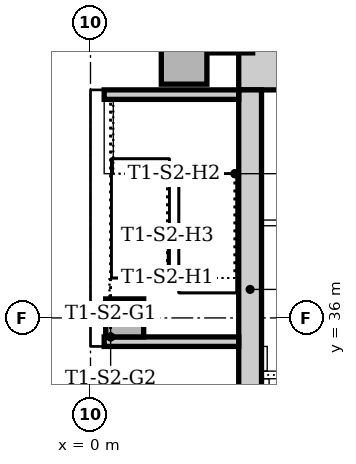
"""IFC4 building model, lengths in metres.
Left out: names, types, materials, properties, quantities, classifications, styles, units other than length and angle.
Written with IfcOpenShell. Run it as: python <this file> out.ifc"""

import sys

from ifc_helpers import new_model, si_unit, direction, frame, frame_2d, origin, origin_2d, place, context, subcontext, project, spatial, rectangle, extrude, element, fill, save


model = new_model("IFC4")
c1 = context("Model", 3, precision=1e-05, world=origin(), true_north=direction((0.0, 1.0)))
c2 = subcontext(c1, "Body", "Model", "MODEL_VIEW")
j1 = project(units=[si_unit("LENGTHUNIT", "METRE"), si_unit("PLANEANGLEUNIT", "RADIAN")], contexts=[c1])
p1 = place(None, origin())
s1 = spatial("IfcSite", under=j1, at=p1, CompositionType="ELEMENT")
p2 = place(p1, origin())
s2 = spatial("IfcBuilding", under=s1, at=p2, CompositionType="ELEMENT")
p3 = place(p2, frame((0.0, 0.0, -5.0)))
s3 = spatial("IfcBuildingStorey", under=s2, at=p3, CompositionType="ELEMENT", Elevation=-5.0)
p4 = place(p3, frame((23.7, 42.6, 0.0), z_axis=(0.0, 0.0, 1.0), x_axis=(-1.0, 0.0, 0.0)))
e1 = element("IfcWall", 1, at=p4, inside=s3, PredefinedType="SOLIDWALL", context=c2, shape_type="SweptSolid", body=[
    extrude(rectangle(XDim=19.8, YDim=1.2, at=frame_2d((9.9, 0.0))), origin(), (0.0, 0.0, 1.0), 5.0),
])
p5 = place(p3, frame((4.2, 42.0, 0.0), z_axis=(0.0, 0.0, 1.0), x_axis=(0.0, -1.0, 0.0)))
e2 = element("IfcWall", 2, at=p5, inside=s3, PredefinedType="SOLIDWALL", context=c2, shape_type="SweptSolid", body=[
    extrude(rectangle(XDim=10.5, YDim=0.6, at=frame_2d((5.25, 0.0))), origin(), (0.0, 0.0, 1.0), 5.0),
])
p6 = place(p5, frame((5.3, 0.0, 0.0)))
e3 = element("IfcOpeningElement", 3, at=p6, cuts=e2, PredefinedType="OPENING", context=c2, shape_type="SweptSolid", body=[
    extrude(rectangle(XDim=1.0, YDim=2.1, at=frame_2d((0.5, 1.05))), frame((0.0, 0.31, 0.0), z_axis=(0.0, -1.0, 0.0), x_axis=(1.0, 0.0, 0.0)), (0.0, 0.0, 1.0), 0.62),
])
p7 = place(p3, frame((0.36, 35.375, 0.0), z_axis=(0.0, 0.0, 1.0), x_axis=(1.0, 0.0, 0.0)))
e4 = element("IfcWall", 4, at=p7, inside=s3, PredefinedType="SOLIDWALL", context=c2, shape_type="SweptSolid", body=[
    extrude(rectangle(XDim=3.54, YDim=0.25, at=frame_2d((1.77, 0.0))), origin(), (0.0, 0.0, 1.0), 5.0),
])
p8 = place(p7, frame((2.14, 0.0, 0.0)))
e5 = element("IfcOpeningElement", 5, at=p8, cuts=e4, PredefinedType="OPENING", context=c2, shape_type="SweptSolid", body=[
    extrude(rectangle(XDim=1.0, YDim=2.1, at=frame_2d((0.5, 1.05))), frame((0.0, 0.135, 0.0), z_axis=(0.0, -1.0, 0.0), x_axis=(1.0, 0.0, 0.0)), (0.0, 0.0, 1.0), 0.27),
])
p9 = place(p3, frame((3.9, 41.875, 0.0), z_axis=(0.0, 0.0, 1.0), x_axis=(-1.0, 0.0, 0.0)))
e6 = element("IfcWall", 6, at=p9, inside=s3, PredefinedType="SOLIDWALL", context=c2, shape_type="SweptSolid", body=[
    extrude(rectangle(XDim=3.54, YDim=0.25, at=frame_2d((1.77, 0.0))), origin(), (0.0, 0.0, 1.0), 5.0),
])
for number, where, z_axis, x_axis in (
    (7, (3.667, 43.574, 0.0), (0.0, 0.0, 1.0), (1.0, 0.0, 0.0)),
    (8, (2.463, 42.75, 0.0), (0.0, 0.0, 1.0), (1.0, 0.0, 0.0)),
):
    element("IfcColumn", number, at=place(p3, frame(where, z_axis=z_axis, x_axis=x_axis)), inside=s3, PredefinedType="COLUMN", context=c2, shape_type="SweptSolid", body=[
        extrude(rectangle(XDim=1.2, YDim=1.2, at=origin_2d()), origin(), (0.0, 0.0, 1.0), 4.7),
    ])
p10 = place(p3, frame((0.9, 36.0, 0.0), z_axis=(0.0, 0.0, 1.0), x_axis=(1.0, 0.0, 0.0)))
e9 = element("IfcColumn", 9, at=p10, inside=s3, PredefinedType="COLUMN", context=c2, shape_type="SweptSolid", body=[
    extrude(rectangle(XDim=1.0, YDim=1.0, at=origin_2d()), origin(), (0.0, 0.0, 1.0), 5.0),
])
p11 = place(p3, frame((0.48, 39.795, 0.0), z_axis=(0.0, 0.0, 1.0), x_axis=(0.0, 1.0, 0.0)))
e10 = element("IfcWall", 10, at=p11, inside=s3, PredefinedType="STANDARD", context=c2, shape_type="SweptSolid", body=[
    extrude(rectangle(XDim=1.955, YDim=0.24, at=frame_2d((0.978, 0.0))), origin(), (0.0, 0.0, 1.0), 5.0),
])
p12 = place(p3, frame((4.5, 34.5, 0.0), z_axis=(0.0, 0.0, 1.0), x_axis=(1.0, 0.0, 0.0)))
e11 = element("IfcWall", 11, at=p12, inside=s3, PredefinedType="PARTITIONING", context=c2, shape_type="SweptSolid", body=[
    extrude(rectangle(XDim=18.0, YDim=0.2, at=frame_2d((9.0, 0.0))), origin(), (0.0, 0.0, 1.0), 4.7),
])
p13 = place(p12, frame((12.95, 0.0, 0.0)))
e12 = element("IfcOpeningElement", 12, at=p13, cuts=e11, PredefinedType="OPENING", context=c2, shape_type="SweptSolid", body=[
    extrude(rectangle(XDim=1.1, YDim=2.1, at=frame_2d((0.55, 1.05))), frame((0.0, 0.11, 0.0), z_axis=(0.0, -1.0, 0.0), x_axis=(1.0, 0.0, 0.0)), (0.0, 0.0, 1.0), 0.22),
])
p14 = place(p12, frame((15.95, 0.0, 0.0)))
e13 = element("IfcOpeningElement", 13, at=p14, cuts=e11, PredefinedType="OPENING", context=c2, shape_type="SweptSolid", body=[
    extrude(rectangle(XDim=1.1, YDim=2.1, at=frame_2d((0.55, 1.05))), frame((0.0, 0.11, 0.0), z_axis=(0.0, -1.0, 0.0), x_axis=(1.0, 0.0, 0.0)), (0.0, 0.0, 1.0), 0.22),
])
p15 = place(p3, frame((4.6, 31.75, 0.0), z_axis=(0.0, 0.0, 1.0), x_axis=(0.0, 1.0, 0.0)))
e14 = element("IfcWall", 14, at=p15, inside=s3, PredefinedType="PARTITIONING", context=c2, shape_type="SweptSolid", body=[
    extrude(rectangle(XDim=2.65, YDim=0.2, at=frame_2d((1.325, 0.0))), origin(), (0.0, 0.0, 1.0), 4.7),
])
p16 = place(p3, frame((4.5, 38.5, 0.0), z_axis=(0.0, 0.0, 1.0), x_axis=(1.0, 0.0, 0.0)))
e15 = element("IfcWall", 15, at=p16, inside=s3, PredefinedType="PARTITIONING", context=c2, shape_type="SweptSolid", body=[
    extrude(rectangle(XDim=11.9, YDim=0.15, at=frame_2d((5.95, 0.0))), origin(), (0.0, 0.0, 1.0), 4.7),
])
p17 = place(p16, frame((1.1, 0.0, 0.0)))
e16 = element("IfcOpeningElement", 16, at=p17, cuts=e15, PredefinedType="OPENING", context=c2, shape_type="SweptSolid", body=[
    extrude(rectangle(XDim=0.9, YDim=2.1, at=frame_2d((0.45, 1.05))), frame((0.0, 0.085, 0.0), z_axis=(0.0, -1.0, 0.0), x_axis=(1.0, 0.0, 0.0)), (0.0, 0.0, 1.0), 0.17),
])
p18 = place(p16, frame((4.05, 0.0, 0.0)))
e17 = element("IfcOpeningElement", 17, at=p18, cuts=e15, PredefinedType="OPENING", context=c2, shape_type="SweptSolid", body=[
    extrude(rectangle(XDim=0.9, YDim=2.1, at=frame_2d((0.45, 1.05))), frame((0.0, 0.085, 0.0), z_axis=(0.0, -1.0, 0.0), x_axis=(1.0, 0.0, 0.0)), (0.0, 0.0, 1.0), 0.17),
])
p19 = place(p16, frame((7.05, 0.0, 0.0)))
e18 = element("IfcOpeningElement", 18, at=p19, cuts=e15, PredefinedType="OPENING", context=c2, shape_type="SweptSolid", body=[
    extrude(rectangle(XDim=0.9, YDim=2.1, at=frame_2d((0.45, 1.05))), frame((0.0, 0.085, 0.0), z_axis=(0.0, -1.0, 0.0), x_axis=(1.0, 0.0, 0.0)), (0.0, 0.0, 1.0), 0.17),
])
p20 = place(p16, frame((9.95, 0.0, 0.0)))
e19 = element("IfcOpeningElement", 19, at=p20, cuts=e15, PredefinedType="OPENING", context=c2, shape_type="SweptSolid", body=[
    extrude(rectangle(XDim=0.8, YDim=2.1, at=frame_2d((0.4, 1.05))), frame((0.0, 0.085, 0.0), z_axis=(0.0, -1.0, 0.0), x_axis=(1.0, 0.0, 0.0)), (0.0, 0.0, 1.0), 0.17),
])
p21 = place(p3, frame((4.575, 34.6, 0.0), z_axis=(0.0, 0.0, 1.0), x_axis=(0.0, 1.0, 0.0)))
e20 = element("IfcWall", 20, at=p21, inside=s3, PredefinedType="PARTITIONING", context=c2, shape_type="SweptSolid", body=[
    extrude(rectangle(XDim=0.65, YDim=0.15, at=frame_2d((0.325, 0.0))), origin(), (0.0, 0.0, 1.0), 4.7),
])
p22 = place(p6, frame((1.0, 0.0, 0.0), z_axis=(0.0, 0.0, 1.0), x_axis=(-1.0, 0.0, 0.0)))
e21 = element("IfcDoor", 21, at=p22, inside=s3, OperationType="SINGLE_SWING_LEFT", PredefinedType="DOOR", context=c2, shape_type="SweptSolid", body=[
    extrude(rectangle(XDim=1.0, YDim=2.1, at=frame_2d((0.5, 1.05))), frame((0.0, 0.025, 0.0), z_axis=(0.0, -1.0, 0.0), x_axis=(1.0, 0.0, 0.0)), (0.0, 0.0, 1.0), 0.05),
])
fill(e3, e21)
p23 = place(p8, origin())
e22 = element("IfcDoor", 22, at=p23, inside=s3, OperationType="SINGLE_SWING_RIGHT", PredefinedType="DOOR", context=c2, shape_type="SweptSolid", body=[
    extrude(rectangle(XDim=1.0, YDim=2.1, at=frame_2d((0.5, 1.05))), frame((0.0, 0.025, 0.0), z_axis=(0.0, -1.0, 0.0), x_axis=(1.0, 0.0, 0.0)), (0.0, 0.0, 1.0), 0.05),
])
fill(e5, e22)
save(model, sys.argv[1])
